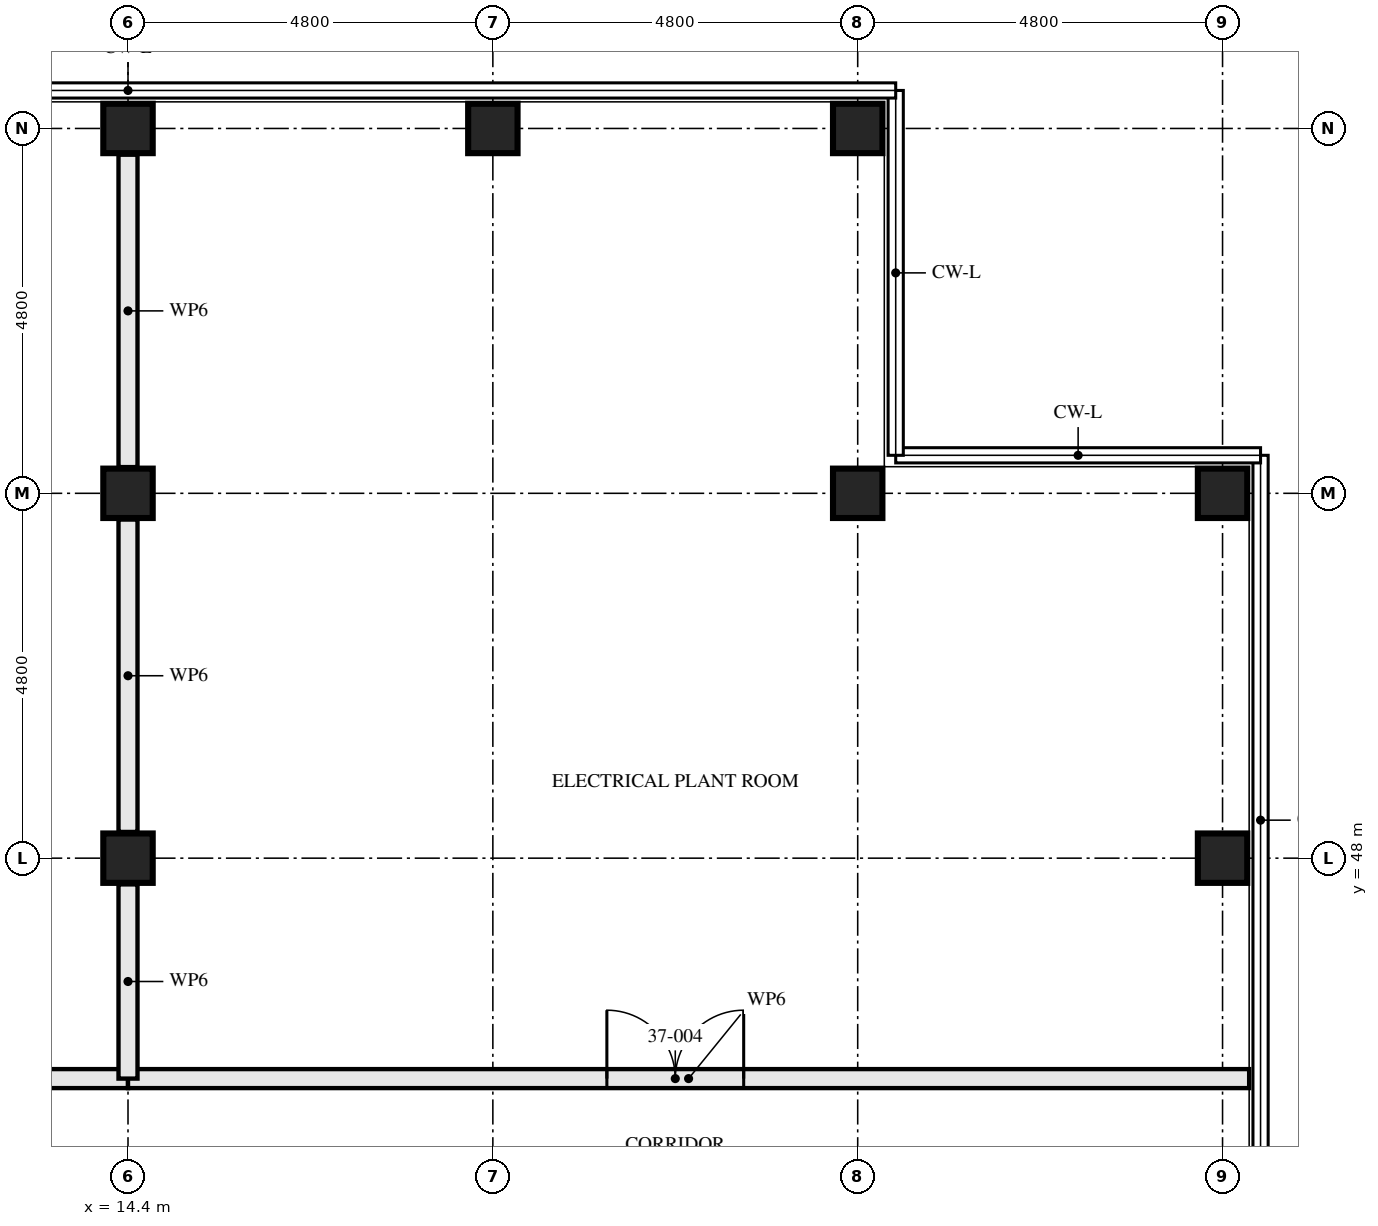
"""IFC4 building model, lengths in metres.
Left out: names, types, materials, properties, quantities, classifications, styles, units other than length and angle.
Written with IfcOpenShell. Run it as: python <this file> out.ifc"""

import sys

from ifc_helpers import new_model, si_unit, direction, frame, frame_2d, origin, origin_2d, place, context, subcontext, project, spatial, rectangle, hollow_rectangle, extrude, element, fill, save


model = new_model("IFC4")
c1 = context("Model", 3, precision=1e-05, world=origin(), true_north=direction((0.0, 1.0)))
c2 = subcontext(c1, "Body", "Model", "MODEL_VIEW")
j1 = project(units=[si_unit("LENGTHUNIT", "METRE"), si_unit("PLANEANGLEUNIT", "RADIAN")], contexts=[c1])
p1 = place(None, origin())
s1 = spatial("IfcSite", under=j1, at=p1, CompositionType="ELEMENT")
p2 = place(p1, origin())
s2 = spatial("IfcBuilding", under=s1, at=p2, CompositionType="ELEMENT")
p3 = place(p2, frame((0.0, 0.0, 136.5)))
s3 = spatial("IfcBuildingStorey", under=s2, at=p3, CompositionType="ELEMENT", Elevation=136.5)
for number, where, z_axis, x_axis in (
    (1, (14.4, 48.0, 0.0), (0.0, 0.0, 1.0), (1.0, 0.0, 0.0)),
    (2, (14.4, 52.8, 0.0), (0.0, 0.0, 1.0), (1.0, 0.0, 0.0)),
):
    element("IfcColumn", number, at=place(p3, frame(where, z_axis=z_axis, x_axis=x_axis)), inside=s3, PredefinedType="COLUMN", context=c2, shape_type="SweptSolid", body=[
        extrude(hollow_rectangle(XDim=0.65, YDim=0.65, WallThickness=0.05, at=origin_2d()), origin(), (0.0, 0.0, 1.0), 4.5),
    ])
p4 = place(p3, frame((14.4, 57.6, 0.0), z_axis=(0.0, 0.0, 1.0), x_axis=(0.0, 1.0, 0.0)))
e3 = element("IfcColumn", 3, at=p4, inside=s3, PredefinedType="COLUMN", context=c2, shape_type="SweptSolid", body=[
    extrude(hollow_rectangle(XDim=0.65, YDim=0.65, WallThickness=0.08, at=origin_2d()), origin(), (0.0, 0.0, 1.0), 4.33),
])
for number, where, z_axis, x_axis in (
    (4, (19.2, 57.6, 0.0), (0.0, 0.0, 1.0), (0.0, 1.0, 0.0)),
    (5, (24.0, 52.8, 0.0), (0.0, 0.0, 1.0), (0.0, 1.0, 0.0)),
    (6, (24.0, 57.6, 0.0), (0.0, 0.0, 1.0), (0.0, 1.0, 0.0)),
    (7, (28.8, 48.0, 0.0), (0.0, 0.0, 1.0), (1.0, 0.0, 0.0)),
    (8, (28.8, 52.8, 0.0), (0.0, 0.0, 1.0), (0.0, 1.0, 0.0)),
):
    element("IfcColumn", number, at=place(p3, frame(where, z_axis=z_axis, x_axis=x_axis)), inside=s3, PredefinedType="COLUMN", context=c2, shape_type="SweptSolid", body=[
        extrude(hollow_rectangle(XDim=0.65, YDim=0.65, WallThickness=0.08, at=origin_2d()), origin(), (0.0, 0.0, 1.0), 4.5),
    ])
p5 = place(p3, frame((14.4, 45.1, 0.0), z_axis=(0.0, 0.0, 1.0), x_axis=(-1.0, 0.0, 0.0)))
e9 = element("IfcWall", 9, at=p5, inside=s3, PredefinedType="SOLIDWALL", context=c2, shape_type="SweptSolid", body=[
    extrude(rectangle(XDim=9.6, YDim=0.25, at=frame_2d((4.8, 0.0))), origin(), (0.0, 0.0, 1.0), 4.33),
])
p6 = place(p5, frame((3.9, 0.0, 0.0)))
e10 = element("IfcOpeningElement", 10, at=p6, cuts=e9, PredefinedType="OPENING", context=c2, shape_type="SweptSolid", body=[
    extrude(rectangle(XDim=1.8, YDim=2.4, at=frame_2d((0.9, 1.2))), frame((0.0, 0.135, 0.0), z_axis=(0.0, -1.0, 0.0), x_axis=(1.0, 0.0, 0.0)), (0.0, 0.0, 1.0), 0.271),
])
p7 = place(p3, frame((29.15, 45.1, 0.0), z_axis=(0.0, 0.0, 1.0), x_axis=(-1.0, 0.0, 0.0)))
e11 = element("IfcWall", 11, at=p7, inside=s3, PredefinedType="SOLIDWALL", context=c2, shape_type="SweptSolid", body=[
    extrude(rectangle(XDim=14.75, YDim=0.25, at=frame_2d((7.375, 0.0))), origin(), (0.0, 0.0, 1.0), 3.12),
])
p8 = place(p7, frame((6.65, 0.0, 0.0)))
e12 = element("IfcOpeningElement", 12, at=p8, cuts=e11, PredefinedType="OPENING", context=c2, shape_type="SweptSolid", body=[
    extrude(rectangle(XDim=1.8, YDim=2.4, at=frame_2d((0.9, 1.2))), frame((0.0, 0.135, 0.0), z_axis=(0.0, -1.0, 0.0), x_axis=(1.0, 0.0, 0.0)), (0.0, 0.0, 1.0), 0.271),
])
p9 = place(p3, frame((14.4, 45.1, 0.0), z_axis=(0.0, 0.0, 1.0), x_axis=(0.0, 1.0, 0.0)))
e13 = element("IfcWall", 13, at=p9, inside=s3, PredefinedType="SOLIDWALL", context=c2, shape_type="SweptSolid", body=[
    extrude(rectangle(XDim=2.555, YDim=0.25, at=frame_2d((1.277, 0.0))), origin(), (0.0, 0.0, 1.0), 2.82),
])
p10 = place(p3, frame((14.4, 48.345, 0.0), z_axis=(0.0, 0.0, 1.0), x_axis=(0.0, 1.0, 0.0)))
e14 = element("IfcWall", 14, at=p10, inside=s3, PredefinedType="SOLIDWALL", context=c2, shape_type="SweptSolid", body=[
    extrude(rectangle(XDim=4.11, YDim=0.25, at=frame_2d((2.055, 0.0))), origin(), (0.0, 0.0, 1.0), 2.82),
])
p11 = place(p3, frame((14.4, 53.145, 0.0), z_axis=(0.0, 0.0, 1.0), x_axis=(0.0, 1.0, 0.0)))
e15 = element("IfcWall", 15, at=p11, inside=s3, PredefinedType="SOLIDWALL", context=c2, shape_type="SweptSolid", body=[
    extrude(rectangle(XDim=4.11, YDim=0.25, at=frame_2d((2.055, 0.0))), origin(), (0.0, 0.0, 1.0), 2.82),
])
p12 = place(p8, frame((1.8, 0.0, 0.0), z_axis=(0.0, 0.0, 1.0), x_axis=(-1.0, 0.0, 0.0)))
e16 = element("IfcDoor", 16, at=p12, inside=s3, OperationType="DOUBLE_DOOR_SINGLE_SWING", PredefinedType="DOOR", context=c2, shape_type="SweptSolid", body=[
    extrude(rectangle(XDim=1.8, YDim=2.4, at=frame_2d((0.9, 1.2))), frame((0.0, 0.032, 0.0), z_axis=(0.0, -1.0, 0.0), x_axis=(1.0, 0.0, 0.0)), (0.0, 0.0, 1.0), 0.064),
])
fill(e12, e16)
save(model, sys.argv[1])
